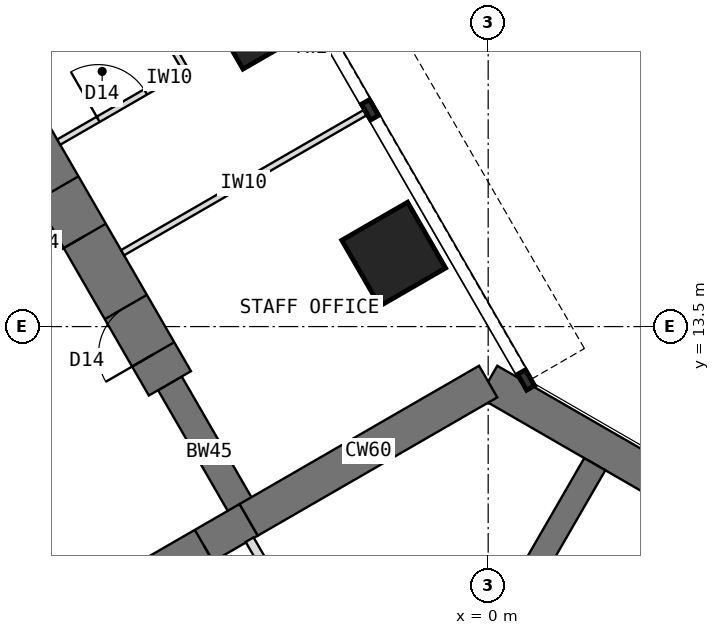
"""IFC4 building model, lengths in metres.
Left out: names, types, materials, properties, quantities, classifications, styles, units other than length and angle.
Written with IfcOpenShell. Run it as: python <this file> out.ifc"""

import sys

from ifc_helpers import new_model, si_unit, direction, frame, frame_2d, origin, origin_2d, place, context, subcontext, project, spatial, rectangle, extrude, element, fill, save


model = new_model("IFC4")
c1 = context("Model", 3, precision=1e-05, world=origin(), true_north=direction((0.0, 1.0)))
c2 = subcontext(c1, "Body", "Model", "MODEL_VIEW")
j1 = project(units=[si_unit("LENGTHUNIT", "METRE"), si_unit("PLANEANGLEUNIT", "RADIAN")], contexts=[c1])
p1 = place(None, origin())
s1 = spatial("IfcSite", under=j1, at=p1, CompositionType="ELEMENT")
p2 = place(p1, origin())
s2 = spatial("IfcBuilding", under=s1, at=p2, CompositionType="ELEMENT")
p3 = place(p2, frame((0.0, 0.0, 145.5)))
s3 = spatial("IfcBuildingStorey", under=s2, at=p3, CompositionType="ELEMENT", Elevation=145.5)
p4 = place(p3, frame((10.908, 6.298, 0.0), z_axis=(0.0, 0.0, 1.0), x_axis=(-0.866021940709, 0.500005998175, 0.0)))
e1 = element("IfcWall", 1, at=p4, inside=s3, PredefinedType="SHEAR", context=c2, shape_type="SweptSolid", body=[
    extrude(rectangle(XDim=12.596, YDim=0.6, at=frame_2d((6.298, 0.0))), origin(), (0.0, 0.0, 1.0), 4.0),
])
p5 = place(p3, frame((0.0, 12.596, 0.0), z_axis=(0.0, 0.0, 1.0), x_axis=(-0.866011268655, -0.500024481964, 0.0)))
e2 = element("IfcWall", 2, at=p5, inside=s3, PredefinedType="SHEAR", context=c2, shape_type="SweptSolid", body=[
    extrude(rectangle(XDim=4.548, YDim=0.6, at=frame_2d((2.274, 0.0))), origin(), (0.0, 0.0, 1.0), 4.0),
])
p6 = place(p3, frame((-3.939, 10.322, 0.0), z_axis=(0.0, 0.0, 1.0), x_axis=(-0.866019471182, -0.500010275428, 0.0)))
e3 = element("IfcWall", 3, at=p6, inside=s3, PredefinedType="SHEAR", context=c2, shape_type="SweptSolid", body=[
    extrude(rectangle(XDim=3.5, YDim=0.6, at=frame_2d((1.75, 0.0))), origin(), (0.0, 0.0, 1.0), 4.0),
])
p7 = place(p6, frame((0.85, 0.0, 0.0)))
e4 = element("IfcOpeningElement", 4, at=p7, cuts=e3, PredefinedType="OPENING", context=c2, shape_type="SweptSolid", body=[
    extrude(rectangle(XDim=1.8, YDim=2.1, at=frame_2d((0.9, 1.05))), frame((0.0, 0.31, 0.0), z_axis=(0.0, -1.0, 0.0), x_axis=(1.0, 0.0, 0.0)), (0.0, 0.0, 1.0), 0.62),
])
for number, where, z_axis, x_axis in (
    (5, (-6.97, 8.572, 0.0), (0.0, 0.0, 1.0), (-0.5, 0.866, 0.0)),
    (6, (-3.939, 10.322, 0.0), (0.0, 0.0, 1.0), (-0.5, 0.866, 0.0)),
):
    element("IfcWall", number, at=place(p3, frame(where, z_axis=z_axis, x_axis=x_axis)), inside=s3, PredefinedType="SHEAR", context=c2, shape_type="SweptSolid", body=[
        extrude(rectangle(XDim=2.592, YDim=0.45, at=frame_2d((1.296, 0.0))), origin(), (0.0, 0.0, 1.0), 4.0),
    ])
p8 = place(p3, frame((-5.234, 12.566, 0.0), z_axis=(0.0, 0.0, 1.0), x_axis=(-0.500010103361, 0.866019570528, 0.0)))
e7 = element("IfcWall", 7, at=p8, inside=s3, PredefinedType="SHEAR", context=c2, shape_type="SweptSolid", body=[
    extrude(rectangle(XDim=13.2, YDim=0.8, at=frame_2d((6.6, 0.0))), origin(), (0.0, 0.0, 1.0), 4.0),
])
p9 = place(p8, frame((0.55, 0.0, 0.0)))
e8 = element("IfcOpeningElement", 8, at=p9, cuts=e7, PredefinedType="OPENING", context=c2, shape_type="SweptSolid", body=[
    extrude(rectangle(XDim=0.9, YDim=2.1, at=frame_2d((0.45, 1.05))), frame((0.0, 0.41, 0.0), z_axis=(0.0, -1.0, 0.0), x_axis=(1.0, 0.0, 0.0)), (0.0, 0.0, 1.0), 0.82),
])
p10 = place(p8, frame((2.8, 0.0, 0.0)))
e9 = element("IfcOpeningElement", 9, at=p10, cuts=e7, PredefinedType="OPENING", context=c2, shape_type="SweptSolid", body=[
    extrude(rectangle(XDim=0.9, YDim=2.1, at=frame_2d((0.45, 1.05))), frame((0.0, 0.41, 0.0), z_axis=(0.0, -1.0, 0.0), x_axis=(1.0, 0.0, 0.0)), (0.0, 0.0, 1.0), 0.82),
])
p11 = place(p8, frame((7.3, 0.0, 0.0)))
e10 = element("IfcOpeningElement", 10, at=p11, cuts=e7, PredefinedType="OPENING", context=c2, shape_type="SweptSolid", body=[
    extrude(rectangle(XDim=0.9, YDim=2.1, at=frame_2d((0.45, 1.05))), frame((0.0, 0.41, 0.0), z_axis=(0.0, -1.0, 0.0), x_axis=(1.0, 0.0, 0.0)), (0.0, 0.0, 1.0), 0.82),
])
for number, where, z_axis, x_axis in (
    (11, (-1.554, 14.691, 0.0), (0.0, 0.0, 1.0), (0.866, 0.5, 0.0)),
    (12, (-3.804, 18.588, 0.0), (0.0, 0.0, 1.0), (0.866, 0.5, 0.0)),
):
    element("IfcColumn", number, at=place(p3, frame(where, z_axis=z_axis, x_axis=x_axis)), inside=s3, PredefinedType="COLUMN", context=c2, shape_type="SweptSolid", body=[
        extrude(rectangle(XDim=1.25, YDim=1.25, at=origin_2d()), origin(), (0.0, 0.0, 1.0), 4.0),
    ])
p12 = place(p3, frame((-1.201, 6.12, 0.0), z_axis=(0.0, 0.0, 1.0), x_axis=(0.49999668571, 0.866027317282, 0.0)))
e13 = element("IfcWall", 13, at=p12, inside=s3, PredefinedType="SHEAR", context=c2, shape_type="SweptSolid", body=[
    extrude(rectangle(XDim=5.908, YDim=0.4, at=frame_2d((2.954, 0.0))), origin(), (0.0, 0.0, 1.0), 4.0),
])
p13 = place(p3, frame((-6.013, 14.715, 0.0), z_axis=(0.0, 0.0, 1.0), x_axis=(0.866016770315, 0.500014953309, 0.0)))
e14 = element("IfcWall", 14, at=p13, inside=s3, PredefinedType="PARTITIONING", context=c2, shape_type="SweptSolid", body=[
    extrude(rectangle(XDim=4.6, YDim=0.1, at=frame_2d((2.3, 0.0))), origin(), (0.0, 0.0, 1.0), 3.8),
])
p14 = place(p3, frame((-4.985, 17.734, 0.0), z_axis=(0.0, 0.0, 1.0), x_axis=(-0.500001309137, 0.866024647952, 0.0)))
e15 = element("IfcWall", 15, at=p14, inside=s3, PredefinedType="PARTITIONING", context=c2, shape_type="SweptSolid", body=[
    extrude(rectangle(XDim=2.4, YDim=0.1, at=frame_2d((1.2, 0.0))), origin(), (0.0, 0.0, 1.0), 3.8),
])
p15 = place(p3, frame((-7.063, 16.533, 0.0), z_axis=(0.0, 0.0, 1.0), x_axis=(0.865980596518, 0.500077600433, 0.0)))
e16 = element("IfcWall", 16, at=p15, inside=s3, PredefinedType="PARTITIONING", context=c2, shape_type="SweptSolid", body=[
    extrude(rectangle(XDim=2.4, YDim=0.1, at=frame_2d((1.2, 0.0))), origin(), (0.0, 0.0, 1.0), 3.8),
])
p16 = place(p15, frame((0.75, 0.0, 0.0)))
e17 = element("IfcOpeningElement", 17, at=p16, cuts=e16, PredefinedType="OPENING", context=c2, shape_type="SweptSolid", body=[
    extrude(rectangle(XDim=0.9, YDim=2.1, at=frame_2d((0.45, 1.05))), frame((0.0, 0.06, 0.0), z_axis=(0.0, -1.0, 0.0), x_axis=(1.0, 0.0, 0.0)), (0.0, 0.0, 1.0), 0.12),
])
p17 = place(p3, frame((-3.924, 9.996, 0.0), z_axis=(0.0, 0.0, 1.0), x_axis=(0.500032713409, -0.866006515865, 0.0)))
e18 = element("IfcWall", 18, at=p17, inside=s3, PredefinedType="PARTITIONING", context=c2, shape_type="SweptSolid", body=[
    extrude(rectangle(XDim=4.518, YDim=0.15, at=frame_2d((2.259, 0.0))), origin(), (0.0, 0.0, 1.0), 3.8),
])
p18 = place(p17, frame((1.749, 0.0, 0.0)))
e19 = element("IfcOpeningElement", 19, at=p18, cuts=e18, PredefinedType="OPENING", context=c2, shape_type="SweptSolid", body=[
    extrude(rectangle(XDim=1.0, YDim=2.1, at=frame_2d((0.5, 1.05))), frame((0.0, 0.085, 0.0), z_axis=(0.0, -1.0, 0.0), x_axis=(1.0, 0.0, 0.0)), (0.0, 0.0, 1.0), 0.17),
])
p19 = place(p7, origin())
e20 = element("IfcDoor", 20, at=p19, inside=s3, OperationType="DOUBLE_DOOR_DOUBLE_SWING", PredefinedType="DOOR", context=c2, shape_type="SweptSolid", body=[
    extrude(rectangle(XDim=1.72, YDim=2.06, at=frame_2d((0.9, 1.03))), frame((0.0, 0.025, 0.0), z_axis=(0.0, -1.0, 0.0), x_axis=(1.0, 0.0, 0.0)), (0.0, 0.0, 1.0), 0.05),
    extrude(rectangle(XDim=0.04, YDim=2.1, at=frame_2d((0.02, 1.05))), frame((0.0, 0.3, 0.0), z_axis=(0.0, -1.0, 0.0), x_axis=(1.0, 0.0, 0.0)), (0.0, 0.0, 1.0), 0.6),
    extrude(rectangle(XDim=0.04, YDim=2.1, at=frame_2d((1.78, 1.05))), frame((0.0, 0.3, 0.0), z_axis=(0.0, -1.0, 0.0), x_axis=(1.0, 0.0, 0.0)), (0.0, 0.0, 1.0), 0.6),
    extrude(rectangle(XDim=1.72, YDim=0.04, at=frame_2d((0.9, 2.08))), frame((0.0, 0.3, 0.0), z_axis=(0.0, -1.0, 0.0), x_axis=(1.0, 0.0, 0.0)), (0.0, 0.0, 1.0), 0.6),
])
fill(e4, e20)
p20 = place(p16, origin())
e21 = element("IfcDoor", 21, at=p20, inside=s3, OperationType="SINGLE_SWING_LEFT", PredefinedType="DOOR", context=c2, shape_type="SweptSolid", body=[
    extrude(rectangle(XDim=0.9, YDim=2.1, at=frame_2d((0.45, 1.05))), frame((0.0, 0.025, 0.0), z_axis=(0.0, -1.0, 0.0), x_axis=(1.0, 0.0, 0.0)), (0.0, 0.0, 1.0), 0.05),
])
fill(e17, e21)
p21 = place(p9, origin())
e22 = element("IfcDoor", 22, at=p21, inside=s3, OperationType="SINGLE_SWING_LEFT", PredefinedType="DOOR", context=c2, shape_type="SweptSolid", body=[
    extrude(rectangle(XDim=0.82, YDim=2.06, at=frame_2d((0.45, 1.03))), frame((0.0, 0.025, 0.0), z_axis=(0.0, -1.0, 0.0), x_axis=(1.0, 0.0, 0.0)), (0.0, 0.0, 1.0), 0.05),
    extrude(rectangle(XDim=0.04, YDim=2.1, at=frame_2d((0.02, 1.05))), frame((0.0, 0.4, 0.0), z_axis=(0.0, -1.0, 0.0), x_axis=(1.0, 0.0, 0.0)), (0.0, 0.0, 1.0), 0.8),
    extrude(rectangle(XDim=0.04, YDim=2.1, at=frame_2d((0.88, 1.05))), frame((0.0, 0.4, 0.0), z_axis=(0.0, -1.0, 0.0), x_axis=(1.0, 0.0, 0.0)), (0.0, 0.0, 1.0), 0.8),
    extrude(rectangle(XDim=0.82, YDim=0.04, at=frame_2d((0.45, 2.08))), frame((0.0, 0.4, 0.0), z_axis=(0.0, -1.0, 0.0), x_axis=(1.0, 0.0, 0.0)), (0.0, 0.0, 1.0), 0.8),
])
fill(e8, e22)
p22 = place(p10, origin())
e23 = element("IfcDoor", 23, at=p22, inside=s3, OperationType="SINGLE_SWING_LEFT", PredefinedType="DOOR", context=c2, shape_type="SweptSolid", body=[
    extrude(rectangle(XDim=0.82, YDim=2.06, at=frame_2d((0.45, 1.03))), frame((0.0, 0.025, 0.0), z_axis=(0.0, -1.0, 0.0), x_axis=(1.0, 0.0, 0.0)), (0.0, 0.0, 1.0), 0.05),
    extrude(rectangle(XDim=0.04, YDim=2.1, at=frame_2d((0.02, 1.05))), frame((0.0, 0.4, 0.0), z_axis=(0.0, -1.0, 0.0), x_axis=(1.0, 0.0, 0.0)), (0.0, 0.0, 1.0), 0.8),
    extrude(rectangle(XDim=0.04, YDim=2.1, at=frame_2d((0.88, 1.05))), frame((0.0, 0.4, 0.0), z_axis=(0.0, -1.0, 0.0), x_axis=(1.0, 0.0, 0.0)), (0.0, 0.0, 1.0), 0.8),
    extrude(rectangle(XDim=0.82, YDim=0.04, at=frame_2d((0.45, 2.08))), frame((0.0, 0.4, 0.0), z_axis=(0.0, -1.0, 0.0), x_axis=(1.0, 0.0, 0.0)), (0.0, 0.0, 1.0), 0.8),
])
fill(e9, e23)
save(model, sys.argv[1])
